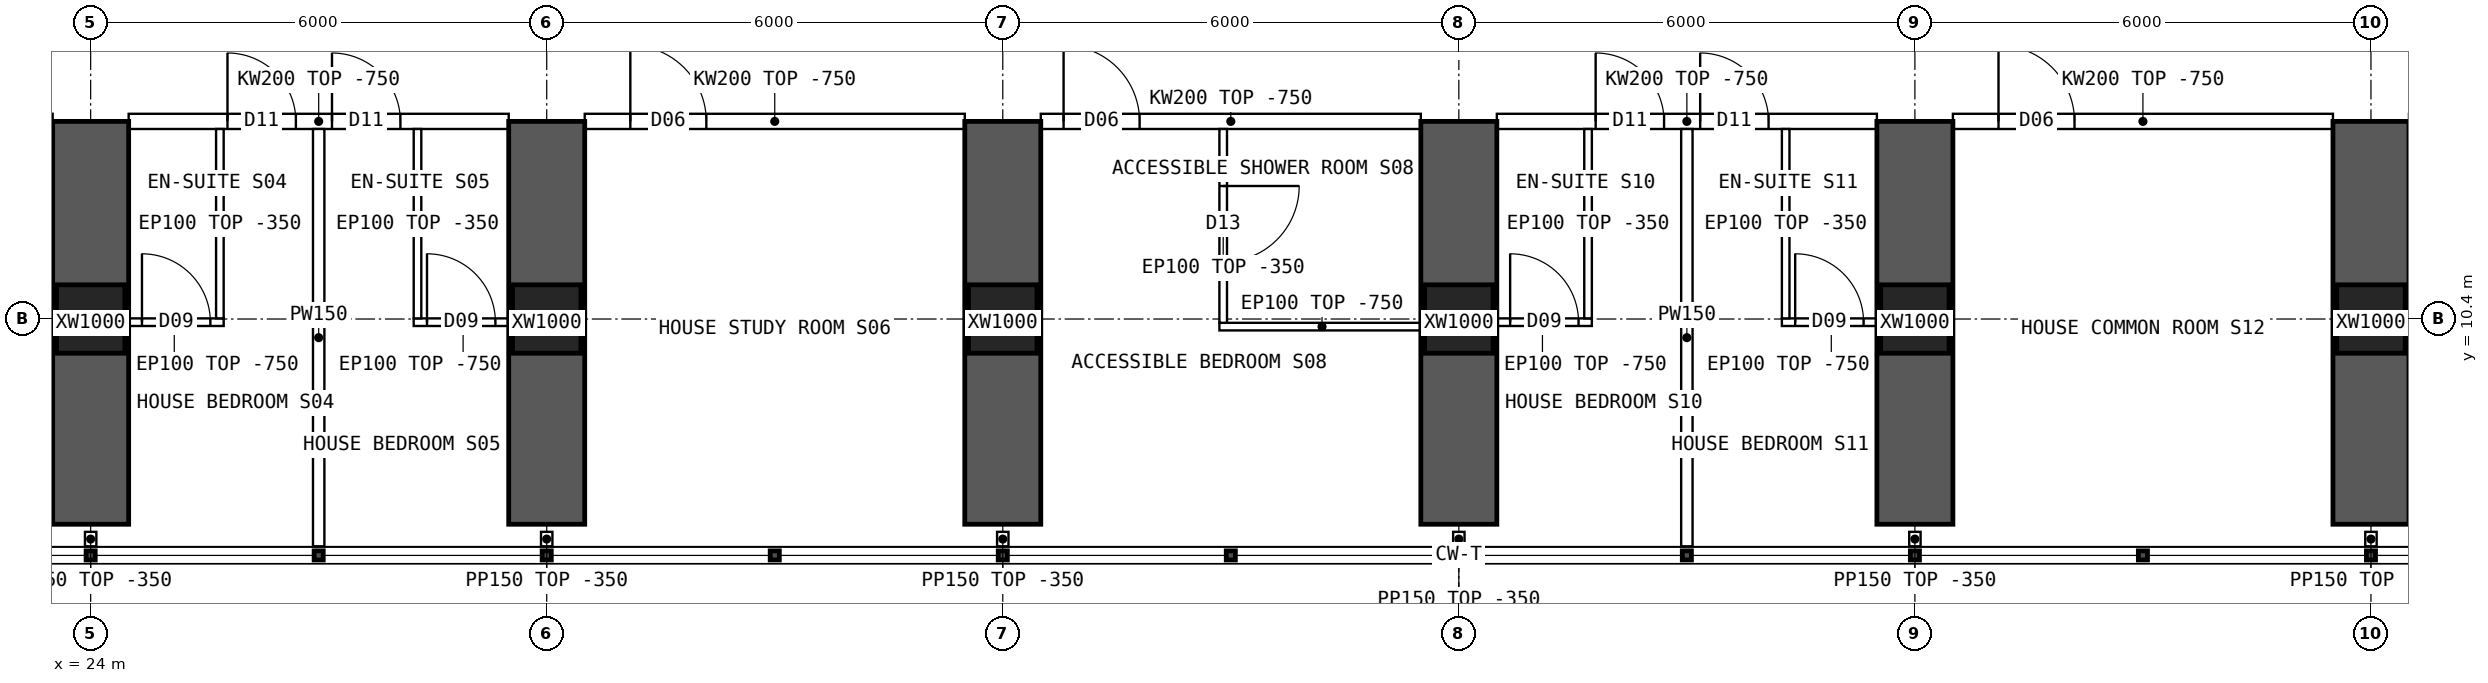
"""IFC4 building model, lengths in metres.
Left out: names, types, materials, properties, quantities, classifications, styles, units other than length and angle.
Written with IfcOpenShell. Run it as: python <this file> out.ifc"""

import sys

from ifc_helpers import new_model, si_unit, direction, frame, frame_2d, origin, origin_2d, place, context, subcontext, project, spatial, polyline, rectangle, hollow_rectangle, outline, extrude, element, fill, save


model = new_model("IFC4")
c1 = context("Model", 3, precision=1e-05, world=origin(), true_north=direction((0.0, 1.0)))
c2 = subcontext(c1, "Body", "Model", "MODEL_VIEW")
j1 = project(units=[si_unit("LENGTHUNIT", "METRE"), si_unit("PLANEANGLEUNIT", "RADIAN")], contexts=[c1])
p1 = place(None, origin())
s1 = spatial("IfcSite", under=j1, at=p1, CompositionType="ELEMENT")
p2 = place(p1, origin())
s2 = spatial("IfcBuilding", under=s1, at=p2, CompositionType="ELEMENT")
p3 = place(p2, frame((0.0, 0.0, 65.2)))
s3 = spatial("IfcBuildingStorey", under=s2, at=p3, CompositionType="ELEMENT", Elevation=65.2)
for number, where, z_axis, x_axis in (
    (1, (24.0, 10.4, 0.0), (0.0, 0.0, 1.0), (1.0, 0.0, 0.0)),
    (2, (30.0, 10.4, 0.0), (0.0, 0.0, 1.0), (1.0, 0.0, 0.0)),
    (3, (36.0, 10.4, 0.0), (0.0, 0.0, 1.0), (1.0, 0.0, 0.0)),
    (4, (42.0, 10.4, 0.0), (0.0, 0.0, 1.0), (1.0, 0.0, 0.0)),
    (5, (48.0, 10.4, 0.0), (0.0, 0.0, 1.0), (1.0, 0.0, 0.0)),
    (6, (54.0, 10.4, 0.0), (0.0, 0.0, 1.0), (1.0, 0.0, 0.0)),
):
    element("IfcColumn", number, at=place(p3, frame(where, z_axis=z_axis, x_axis=x_axis)), inside=s3, PredefinedType="COLUMN", context=c2, shape_type="SweptSolid", body=[
        extrude(hollow_rectangle(XDim=0.9, YDim=0.9, WallThickness=0.09, at=origin_2d()), origin(), (0.0, 0.0, 1.0), 3.75),
    ])
for number, where, z_axis, x_axis in (
    (7, (24.0, 7.7, 0.0), (0.0, 0.0, 1.0), (0.0, 1.0, 0.0)),
    (8, (30.0, 7.7, 0.0), (0.0, 0.0, 1.0), (0.0, 1.0, 0.0)),
    (9, (36.0, 7.7, 0.0), (0.0, 0.0, 1.0), (0.0, 1.0, 0.0)),
    (10, (42.0, 7.7, 0.0), (0.0, 0.0, 1.0), (0.0, 1.0, 0.0)),
    (11, (48.0, 7.7, 0.0), (0.0, 0.0, 1.0), (0.0, 1.0, 0.0)),
    (12, (54.0, 7.7, 0.0), (0.0, 0.0, 1.0), (0.0, 1.0, 0.0)),
):
    element("IfcWall", number, at=place(p3, frame(where, z_axis=z_axis, x_axis=x_axis)), inside=s3, PredefinedType="SHEAR", context=c2, shape_type="SweptSolid", body=[
        extrude(rectangle(XDim=5.3, YDim=1.0, at=frame_2d((2.65, 0.0))), origin(), (0.0, 0.0, 1.0), 3.75),
    ])
p4 = place(p3, frame((24.5, 13.0, 0.0), z_axis=(0.0, 0.0, 1.0), x_axis=(1.0, 0.0, 0.0)))
e13 = element("IfcWall", 13, at=p4, inside=s3, PredefinedType="SOLIDWALL", context=c2, shape_type="SweptSolid", body=[
    extrude(outline(polyline([(0.0, 0.0), (5.0, 0.0), (5.0, 3.0), (0.0, 3.0), (0.0, 0.0)])), frame((0.0, 0.1, 0.0), z_axis=(0.0, -1.0, 0.0), x_axis=(1.0, 0.0, 0.0)), (0.0, 0.0, 1.0), 0.2),
])
p5 = place(p4, frame((1.3, 0.0, 0.0)))
e14 = element("IfcOpeningElement", 14, at=p5, cuts=e13, PredefinedType="OPENING", context=c2, shape_type="SweptSolid", body=[
    extrude(rectangle(XDim=0.9, YDim=2.1, at=frame_2d((0.45, 1.05))), frame((0.0, 0.11, 0.0), z_axis=(0.0, -1.0, 0.0), x_axis=(1.0, 0.0, 0.0)), (0.0, 0.0, 1.0), 0.22),
])
p6 = place(p4, frame((2.675, 0.0, 0.0)))
e15 = element("IfcOpeningElement", 15, at=p6, cuts=e13, PredefinedType="OPENING", context=c2, shape_type="SweptSolid", body=[
    extrude(rectangle(XDim=0.9, YDim=2.1, at=frame_2d((0.45, 1.05))), frame((0.0, 0.11, 0.0), z_axis=(0.0, -1.0, 0.0), x_axis=(1.0, 0.0, 0.0)), (0.0, 0.0, 1.0), 0.22),
])
p7 = place(p3, frame((30.5, 13.0, 0.0), z_axis=(0.0, 0.0, 1.0), x_axis=(1.0, 0.0, 0.0)))
e16 = element("IfcWall", 16, at=p7, inside=s3, PredefinedType="SOLIDWALL", context=c2, shape_type="SweptSolid", body=[
    extrude(outline(polyline([(0.0, 0.0), (5.0, 0.0), (5.0, 3.0), (0.0, 3.0), (0.0, 0.0)])), frame((0.0, 0.1, 0.0), z_axis=(0.0, -1.0, 0.0), x_axis=(1.0, 0.0, 0.0)), (0.0, 0.0, 1.0), 0.2),
])
p8 = place(p7, frame((0.6, 0.0, 0.0)))
e17 = element("IfcOpeningElement", 17, at=p8, cuts=e16, PredefinedType="OPENING", context=c2, shape_type="SweptSolid", body=[
    extrude(rectangle(XDim=1.0, YDim=2.1, at=frame_2d((0.5, 1.05))), frame((0.0, 0.11, 0.0), z_axis=(0.0, -1.0, 0.0), x_axis=(1.0, 0.0, 0.0)), (0.0, 0.0, 1.0), 0.22),
])
p9 = place(p3, frame((36.5, 13.0, 0.0), z_axis=(0.0, 0.0, 1.0), x_axis=(1.0, 0.0, 0.0)))
e18 = element("IfcWall", 18, at=p9, inside=s3, PredefinedType="SOLIDWALL", context=c2, shape_type="SweptSolid", body=[
    extrude(outline(polyline([(0.0, 0.0), (5.0, 0.0), (5.0, 3.0), (0.0, 3.0), (0.0, 0.0)])), frame((0.0, 0.1, 0.0), z_axis=(0.0, -1.0, 0.0), x_axis=(1.0, 0.0, 0.0)), (0.0, 0.0, 1.0), 0.2),
])
p10 = place(p9, frame((0.3, 0.0, 0.0)))
e19 = element("IfcOpeningElement", 19, at=p10, cuts=e18, PredefinedType="OPENING", context=c2, shape_type="SweptSolid", body=[
    extrude(rectangle(XDim=1.0, YDim=2.1, at=frame_2d((0.5, 1.05))), frame((0.0, 0.11, 0.0), z_axis=(0.0, -1.0, 0.0), x_axis=(1.0, 0.0, 0.0)), (0.0, 0.0, 1.0), 0.22),
])
p11 = place(p3, frame((42.5, 13.0, 0.0), z_axis=(0.0, 0.0, 1.0), x_axis=(1.0, 0.0, 0.0)))
e20 = element("IfcWall", 20, at=p11, inside=s3, PredefinedType="SOLIDWALL", context=c2, shape_type="SweptSolid", body=[
    extrude(outline(polyline([(0.0, 0.0), (5.0, 0.0), (5.0, 3.0), (0.0, 3.0), (0.0, 0.0)])), frame((0.0, 0.1, 0.0), z_axis=(0.0, -1.0, 0.0), x_axis=(1.0, 0.0, 0.0)), (0.0, 0.0, 1.0), 0.2),
])
p12 = place(p11, frame((1.3, 0.0, 0.0)))
e21 = element("IfcOpeningElement", 21, at=p12, cuts=e20, PredefinedType="OPENING", context=c2, shape_type="SweptSolid", body=[
    extrude(rectangle(XDim=0.9, YDim=2.1, at=frame_2d((0.45, 1.05))), frame((0.0, 0.11, 0.0), z_axis=(0.0, -1.0, 0.0), x_axis=(1.0, 0.0, 0.0)), (0.0, 0.0, 1.0), 0.22),
])
p13 = place(p11, frame((2.675, 0.0, 0.0)))
e22 = element("IfcOpeningElement", 22, at=p13, cuts=e20, PredefinedType="OPENING", context=c2, shape_type="SweptSolid", body=[
    extrude(rectangle(XDim=0.9, YDim=2.1, at=frame_2d((0.45, 1.05))), frame((0.0, 0.11, 0.0), z_axis=(0.0, -1.0, 0.0), x_axis=(1.0, 0.0, 0.0)), (0.0, 0.0, 1.0), 0.22),
])
p14 = place(p3, frame((48.5, 13.0, 0.0), z_axis=(0.0, 0.0, 1.0), x_axis=(1.0, 0.0, 0.0)))
e23 = element("IfcWall", 23, at=p14, inside=s3, PredefinedType="SOLIDWALL", context=c2, shape_type="SweptSolid", body=[
    extrude(outline(polyline([(0.0, 0.0), (5.0, 0.0), (5.0, 3.0), (0.0, 3.0), (0.0, 0.0)])), frame((0.0, 0.1, 0.0), z_axis=(0.0, -1.0, 0.0), x_axis=(1.0, 0.0, 0.0)), (0.0, 0.0, 1.0), 0.2),
])
p15 = place(p14, frame((0.6, 0.0, 0.0)))
e24 = element("IfcOpeningElement", 24, at=p15, cuts=e23, PredefinedType="OPENING", context=c2, shape_type="SweptSolid", body=[
    extrude(rectangle(XDim=1.0, YDim=2.1, at=frame_2d((0.5, 1.05))), frame((0.0, 0.11, 0.0), z_axis=(0.0, -1.0, 0.0), x_axis=(1.0, 0.0, 0.0)), (0.0, 0.0, 1.0), 0.22),
])
p16 = place(p3, frame((27.0, 7.41, 0.0), z_axis=(0.0, 0.0, 1.0), x_axis=(0.0, 1.0, 0.0)))
e25 = element("IfcWall", 25, at=p16, inside=s3, PredefinedType="PARTITIONING", context=c2, shape_type="SweptSolid", body=[
    extrude(outline(polyline([(0.0, 0.0), (5.49, 0.0), (5.49, 3.0), (5.442, 3.0), (5.44, 3.4), (3.192, 3.4), (3.19, 3.0), (2.792, 3.0), (2.79, 3.4), (0.0, 3.4), (0.0, 0.0)])), frame((0.0, 0.075, 0.0), z_axis=(0.0, -1.0, 0.0), x_axis=(1.0, 0.0, 0.0)), (0.0, 0.0, 1.0), 0.15),
])
p17 = place(p3, frame((25.75, 10.358, 0.0), z_axis=(0.0, 0.0, 1.0), x_axis=(-1.0, 0.0, 0.0)))
e26 = element("IfcWall", 26, at=p17, inside=s3, PredefinedType="PARTITIONING", context=c2, shape_type="SweptSolid", body=[
    extrude(outline(polyline([(0.0, 0.0), (1.3, 0.0), (1.3, 3.0), (0.0, 3.0), (0.0, 0.0)])), frame((0.0, 0.05, 0.0), z_axis=(0.0, -1.0, 0.0), x_axis=(1.0, 0.0, 0.0)), (0.0, 0.0, 1.0), 0.1),
])
p18 = place(p17, frame((0.175, 0.0, 0.0)))
e27 = element("IfcOpeningElement", 27, at=p18, cuts=e26, PredefinedType="OPENING", context=c2, shape_type="SweptSolid", body=[
    extrude(rectangle(XDim=0.9, YDim=2.1, at=frame_2d((0.45, 1.05))), frame((0.0, 0.06, 0.0), z_axis=(0.0, -1.0, 0.0), x_axis=(1.0, 0.0, 0.0)), (0.0, 0.0, 1.0), 0.12),
])
p19 = place(p3, frame((25.7, 10.408, 0.0), z_axis=(0.0, 0.0, 1.0), x_axis=(0.0, 1.0, 0.0)))
e28 = element("IfcWall", 28, at=p19, inside=s3, PredefinedType="PARTITIONING", context=c2, shape_type="SweptSolid", body=[
    extrude(outline(polyline([(0.0, 0.0), (2.492, 0.0), (2.492, 3.0), (2.444, 3.0), (2.442, 3.4), (0.194, 3.4), (0.192, 3.0), (0.0, 3.0), (0.0, 0.0)])), frame((0.0, 0.05, 0.0), z_axis=(0.0, -1.0, 0.0), x_axis=(1.0, 0.0, 0.0)), (0.0, 0.0, 1.0), 0.1),
])
p20 = place(p3, frame((29.55, 10.358, 0.0), z_axis=(0.0, 0.0, 1.0), x_axis=(-1.0, 0.0, 0.0)))
e29 = element("IfcWall", 29, at=p20, inside=s3, PredefinedType="PARTITIONING", context=c2, shape_type="SweptSolid", body=[
    extrude(outline(polyline([(0.0, 0.0), (1.3, 0.0), (1.3, 3.0), (0.0, 3.0), (0.0, 0.0)])), frame((0.0, 0.05, 0.0), z_axis=(0.0, -1.0, 0.0), x_axis=(1.0, 0.0, 0.0)), (0.0, 0.0, 1.0), 0.1),
])
p21 = place(p20, frame((0.225, 0.0, 0.0)))
e30 = element("IfcOpeningElement", 30, at=p21, cuts=e29, PredefinedType="OPENING", context=c2, shape_type="SweptSolid", body=[
    extrude(rectangle(XDim=0.9, YDim=2.1, at=frame_2d((0.45, 1.05))), frame((0.0, 0.06, 0.0), z_axis=(0.0, -1.0, 0.0), x_axis=(1.0, 0.0, 0.0)), (0.0, 0.0, 1.0), 0.12),
])
p22 = place(p3, frame((28.3, 10.408, 0.0), z_axis=(0.0, 0.0, 1.0), x_axis=(0.0, 1.0, 0.0)))
e31 = element("IfcWall", 31, at=p22, inside=s3, PredefinedType="PARTITIONING", context=c2, shape_type="SweptSolid", body=[
    extrude(outline(polyline([(0.0, 0.0), (2.492, 0.0), (2.492, 3.0), (2.444, 3.0), (2.442, 3.4), (0.194, 3.4), (0.192, 3.0), (0.0, 3.0), (0.0, 0.0)])), frame((0.0, 0.05, 0.0), z_axis=(0.0, -1.0, 0.0), x_axis=(1.0, 0.0, 0.0)), (0.0, 0.0, 1.0), 0.1),
])
p23 = place(p3, frame((38.85, 10.3, 0.0), z_axis=(0.0, 0.0, 1.0), x_axis=(1.0, 0.0, 0.0)))
e32 = element("IfcWall", 32, at=p23, inside=s3, PredefinedType="PARTITIONING", context=c2, shape_type="SweptSolid", body=[
    extrude(outline(polyline([(0.0, 0.0), (2.7, 0.0), (2.7, 3.0), (0.0, 3.0), (0.0, 0.0)])), frame((0.0, 0.05, 0.0), z_axis=(0.0, -1.0, 0.0), x_axis=(1.0, 0.0, 0.0)), (0.0, 0.0, 1.0), 0.1),
])
p24 = place(p3, frame((38.9, 10.35, 0.0), z_axis=(0.0, 0.0, 1.0), x_axis=(0.0, 1.0, 0.0)))
e33 = element("IfcWall", 33, at=p24, inside=s3, PredefinedType="PARTITIONING", context=c2, shape_type="SweptSolid", body=[
    extrude(outline(polyline([(0.0, 0.0), (2.55, 0.0), (2.55, 3.0), (2.502, 3.0), (2.5, 3.4), (0.252, 3.4), (0.25, 3.0), (0.0, 3.0), (0.0, 0.0)])), frame((0.0, 0.05, 0.0), z_axis=(0.0, -1.0, 0.0), x_axis=(1.0, 0.0, 0.0)), (0.0, 0.0, 1.0), 0.1),
])
p25 = place(p24, frame((0.8, 0.0, 0.0)))
e34 = element("IfcOpeningElement", 34, at=p25, cuts=e33, PredefinedType="OPENING", context=c2, shape_type="SweptSolid", body=[
    extrude(rectangle(XDim=1.0, YDim=2.1, at=frame_2d((0.5, 1.05))), frame((0.0, 0.06, 0.0), z_axis=(0.0, -1.0, 0.0), x_axis=(1.0, 0.0, 0.0)), (0.0, 0.0, 1.0), 0.12),
])
p26 = place(p3, frame((45.0, 7.41, 0.0), z_axis=(0.0, 0.0, 1.0), x_axis=(0.0, 1.0, 0.0)))
e35 = element("IfcWall", 35, at=p26, inside=s3, PredefinedType="PARTITIONING", context=c2, shape_type="SweptSolid", body=[
    extrude(outline(polyline([(0.0, 0.0), (5.49, 0.0), (5.49, 3.0), (5.442, 3.0), (5.44, 3.4), (3.192, 3.4), (3.19, 3.0), (2.792, 3.0), (2.79, 3.4), (0.0, 3.4), (0.0, 0.0)])), frame((0.0, 0.075, 0.0), z_axis=(0.0, -1.0, 0.0), x_axis=(1.0, 0.0, 0.0)), (0.0, 0.0, 1.0), 0.15),
])
p27 = place(p3, frame((43.75, 10.358, 0.0), z_axis=(0.0, 0.0, 1.0), x_axis=(-1.0, 0.0, 0.0)))
e36 = element("IfcWall", 36, at=p27, inside=s3, PredefinedType="PARTITIONING", context=c2, shape_type="SweptSolid", body=[
    extrude(outline(polyline([(0.0, 0.0), (1.3, 0.0), (1.3, 3.0), (0.0, 3.0), (0.0, 0.0)])), frame((0.0, 0.05, 0.0), z_axis=(0.0, -1.0, 0.0), x_axis=(1.0, 0.0, 0.0)), (0.0, 0.0, 1.0), 0.1),
])
p28 = place(p27, frame((0.175, 0.0, 0.0)))
e37 = element("IfcOpeningElement", 37, at=p28, cuts=e36, PredefinedType="OPENING", context=c2, shape_type="SweptSolid", body=[
    extrude(rectangle(XDim=0.9, YDim=2.1, at=frame_2d((0.45, 1.05))), frame((0.0, 0.06, 0.0), z_axis=(0.0, -1.0, 0.0), x_axis=(1.0, 0.0, 0.0)), (0.0, 0.0, 1.0), 0.12),
])
p29 = place(p3, frame((43.7, 10.408, 0.0), z_axis=(0.0, 0.0, 1.0), x_axis=(0.0, 1.0, 0.0)))
e38 = element("IfcWall", 38, at=p29, inside=s3, PredefinedType="PARTITIONING", context=c2, shape_type="SweptSolid", body=[
    extrude(outline(polyline([(0.0, 0.0), (2.492, 0.0), (2.492, 3.0), (2.444, 3.0), (2.442, 3.4), (0.194, 3.4), (0.192, 3.0), (0.0, 3.0), (0.0, 0.0)])), frame((0.0, 0.05, 0.0), z_axis=(0.0, -1.0, 0.0), x_axis=(1.0, 0.0, 0.0)), (0.0, 0.0, 1.0), 0.1),
])
p30 = place(p3, frame((47.55, 10.358, 0.0), z_axis=(0.0, 0.0, 1.0), x_axis=(-1.0, 0.0, 0.0)))
e39 = element("IfcWall", 39, at=p30, inside=s3, PredefinedType="PARTITIONING", context=c2, shape_type="SweptSolid", body=[
    extrude(outline(polyline([(0.0, 0.0), (1.3, 0.0), (1.3, 3.0), (0.0, 3.0), (0.0, 0.0)])), frame((0.0, 0.05, 0.0), z_axis=(0.0, -1.0, 0.0), x_axis=(1.0, 0.0, 0.0)), (0.0, 0.0, 1.0), 0.1),
])
p31 = place(p30, frame((0.225, 0.0, 0.0)))
e40 = element("IfcOpeningElement", 40, at=p31, cuts=e39, PredefinedType="OPENING", context=c2, shape_type="SweptSolid", body=[
    extrude(rectangle(XDim=0.9, YDim=2.1, at=frame_2d((0.45, 1.05))), frame((0.0, 0.06, 0.0), z_axis=(0.0, -1.0, 0.0), x_axis=(1.0, 0.0, 0.0)), (0.0, 0.0, 1.0), 0.12),
])
p32 = place(p3, frame((46.3, 10.408, 0.0), z_axis=(0.0, 0.0, 1.0), x_axis=(0.0, 1.0, 0.0)))
e41 = element("IfcWall", 41, at=p32, inside=s3, PredefinedType="PARTITIONING", context=c2, shape_type="SweptSolid", body=[
    extrude(outline(polyline([(0.0, 0.0), (2.492, 0.0), (2.492, 3.0), (2.444, 3.0), (2.442, 3.4), (0.194, 3.4), (0.192, 3.0), (0.0, 3.0), (0.0, 0.0)])), frame((0.0, 0.05, 0.0), z_axis=(0.0, -1.0, 0.0), x_axis=(1.0, 0.0, 0.0)), (0.0, 0.0, 1.0), 0.1),
])
for number, where, z_axis, x_axis in (
    (42, (24.0, 7.6, 0.0), (0.0, 0.0, 1.0), (0.0, -1.0, 0.0)),
    (43, (30.0, 7.6, 0.0), (0.0, 0.0, 1.0), (0.0, -1.0, 0.0)),
    (44, (36.0, 7.6, 0.0), (0.0, 0.0, 1.0), (0.0, -1.0, 0.0)),
    (45, (42.0, 7.6, 0.0), (0.0, 0.0, 1.0), (0.0, -1.0, 0.0)),
    (46, (48.0, 7.6, 0.0), (0.0, 0.0, 1.0), (0.0, -1.0, 0.0)),
    (47, (54.0, 7.6, 0.0), (0.0, 0.0, 1.0), (0.0, -1.0, 0.0)),
):
    element("IfcWall", number, at=place(p3, frame(where, z_axis=z_axis, x_axis=x_axis)), inside=s3, PredefinedType="PARTITIONING", context=c2, shape_type="SweptSolid", body=[
        extrude(rectangle(XDim=0.19, YDim=0.15, at=frame_2d((0.095, 0.0))), origin(), (0.0, 0.0, 1.0), 3.4),
    ])
p33 = place(p18, origin())
e48 = element("IfcDoor", 48, at=p33, inside=s3, OperationType="SINGLE_SWING_RIGHT", PredefinedType="DOOR", context=c2, shape_type="SweptSolid", body=[
    extrude(rectangle(XDim=0.9, YDim=2.1, at=frame_2d((0.45, 1.05))), frame((0.0, 0.025, 0.0), z_axis=(0.0, -1.0, 0.0), x_axis=(1.0, 0.0, 0.0)), (0.0, 0.0, 1.0), 0.05),
])
fill(e27, e48)
p34 = place(p5, origin())
e49 = element("IfcDoor", 49, at=p34, inside=s3, OperationType="SINGLE_SWING_LEFT", PredefinedType="DOOR", context=c2, shape_type="SweptSolid", body=[
    extrude(rectangle(XDim=0.9, YDim=2.1, at=frame_2d((0.45, 1.05))), frame((0.0, 0.025, 0.0), z_axis=(0.0, -1.0, 0.0), x_axis=(1.0, 0.0, 0.0)), (0.0, 0.0, 1.0), 0.05),
])
fill(e14, e49)
p35 = place(p21, origin())
e50 = element("IfcDoor", 50, at=p35, inside=s3, OperationType="SINGLE_SWING_RIGHT", PredefinedType="DOOR", context=c2, shape_type="SweptSolid", body=[
    extrude(rectangle(XDim=0.9, YDim=2.1, at=frame_2d((0.45, 1.05))), frame((0.0, 0.025, 0.0), z_axis=(0.0, -1.0, 0.0), x_axis=(1.0, 0.0, 0.0)), (0.0, 0.0, 1.0), 0.05),
])
fill(e30, e50)
p36 = place(p6, origin())
e51 = element("IfcDoor", 51, at=p36, inside=s3, OperationType="SINGLE_SWING_LEFT", PredefinedType="DOOR", context=c2, shape_type="SweptSolid", body=[
    extrude(rectangle(XDim=0.9, YDim=2.1, at=frame_2d((0.45, 1.05))), frame((0.0, 0.025, 0.0), z_axis=(0.0, -1.0, 0.0), x_axis=(1.0, 0.0, 0.0)), (0.0, 0.0, 1.0), 0.05),
])
fill(e15, e51)
p37 = place(p8, origin())
e52 = element("IfcDoor", 52, at=p37, inside=s3, OperationType="SINGLE_SWING_LEFT", PredefinedType="DOOR", context=c2, shape_type="SweptSolid", body=[
    extrude(rectangle(XDim=1.0, YDim=2.1, at=frame_2d((0.5, 1.05))), frame((0.0, 0.025, 0.0), z_axis=(0.0, -1.0, 0.0), x_axis=(1.0, 0.0, 0.0)), (0.0, 0.0, 1.0), 0.05),
])
fill(e17, e52)
p38 = place(p25, origin())
e53 = element("IfcDoor", 53, at=p38, inside=s3, OperationType="SINGLE_SWING_RIGHT", PredefinedType="DOOR", context=c2, shape_type="SweptSolid", body=[
    extrude(rectangle(XDim=1.0, YDim=2.1, at=frame_2d((0.5, 1.05))), frame((0.0, 0.025, 0.0), z_axis=(0.0, -1.0, 0.0), x_axis=(1.0, 0.0, 0.0)), (0.0, 0.0, 1.0), 0.05),
])
fill(e34, e53)
p39 = place(p10, origin())
e54 = element("IfcDoor", 54, at=p39, inside=s3, OperationType="SINGLE_SWING_LEFT", PredefinedType="DOOR", context=c2, shape_type="SweptSolid", body=[
    extrude(rectangle(XDim=1.0, YDim=2.1, at=frame_2d((0.5, 1.05))), frame((0.0, 0.025, 0.0), z_axis=(0.0, -1.0, 0.0), x_axis=(1.0, 0.0, 0.0)), (0.0, 0.0, 1.0), 0.05),
])
fill(e19, e54)
p40 = place(p28, origin())
e55 = element("IfcDoor", 55, at=p40, inside=s3, OperationType="SINGLE_SWING_RIGHT", PredefinedType="DOOR", context=c2, shape_type="SweptSolid", body=[
    extrude(rectangle(XDim=0.9, YDim=2.1, at=frame_2d((0.45, 1.05))), frame((0.0, 0.025, 0.0), z_axis=(0.0, -1.0, 0.0), x_axis=(1.0, 0.0, 0.0)), (0.0, 0.0, 1.0), 0.05),
])
fill(e37, e55)
p41 = place(p12, origin())
e56 = element("IfcDoor", 56, at=p41, inside=s3, OperationType="SINGLE_SWING_LEFT", PredefinedType="DOOR", context=c2, shape_type="SweptSolid", body=[
    extrude(rectangle(XDim=0.9, YDim=2.1, at=frame_2d((0.45, 1.05))), frame((0.0, 0.025, 0.0), z_axis=(0.0, -1.0, 0.0), x_axis=(1.0, 0.0, 0.0)), (0.0, 0.0, 1.0), 0.05),
])
fill(e21, e56)
p42 = place(p31, origin())
e57 = element("IfcDoor", 57, at=p42, inside=s3, OperationType="SINGLE_SWING_RIGHT", PredefinedType="DOOR", context=c2, shape_type="SweptSolid", body=[
    extrude(rectangle(XDim=0.9, YDim=2.1, at=frame_2d((0.45, 1.05))), frame((0.0, 0.025, 0.0), z_axis=(0.0, -1.0, 0.0), x_axis=(1.0, 0.0, 0.0)), (0.0, 0.0, 1.0), 0.05),
])
fill(e40, e57)
p43 = place(p13, origin())
e58 = element("IfcDoor", 58, at=p43, inside=s3, OperationType="SINGLE_SWING_LEFT", PredefinedType="DOOR", context=c2, shape_type="SweptSolid", body=[
    extrude(rectangle(XDim=0.9, YDim=2.1, at=frame_2d((0.45, 1.05))), frame((0.0, 0.025, 0.0), z_axis=(0.0, -1.0, 0.0), x_axis=(1.0, 0.0, 0.0)), (0.0, 0.0, 1.0), 0.05),
])
fill(e22, e58)
p44 = place(p15, origin())
e59 = element("IfcDoor", 59, at=p44, inside=s3, OperationType="SINGLE_SWING_LEFT", PredefinedType="DOOR", context=c2, shape_type="SweptSolid", body=[
    extrude(rectangle(XDim=1.0, YDim=2.1, at=frame_2d((0.5, 1.05))), frame((0.0, 0.025, 0.0), z_axis=(0.0, -1.0, 0.0), x_axis=(1.0, 0.0, 0.0)), (0.0, 0.0, 1.0), 0.05),
])
fill(e24, e59)
save(model, sys.argv[1])
